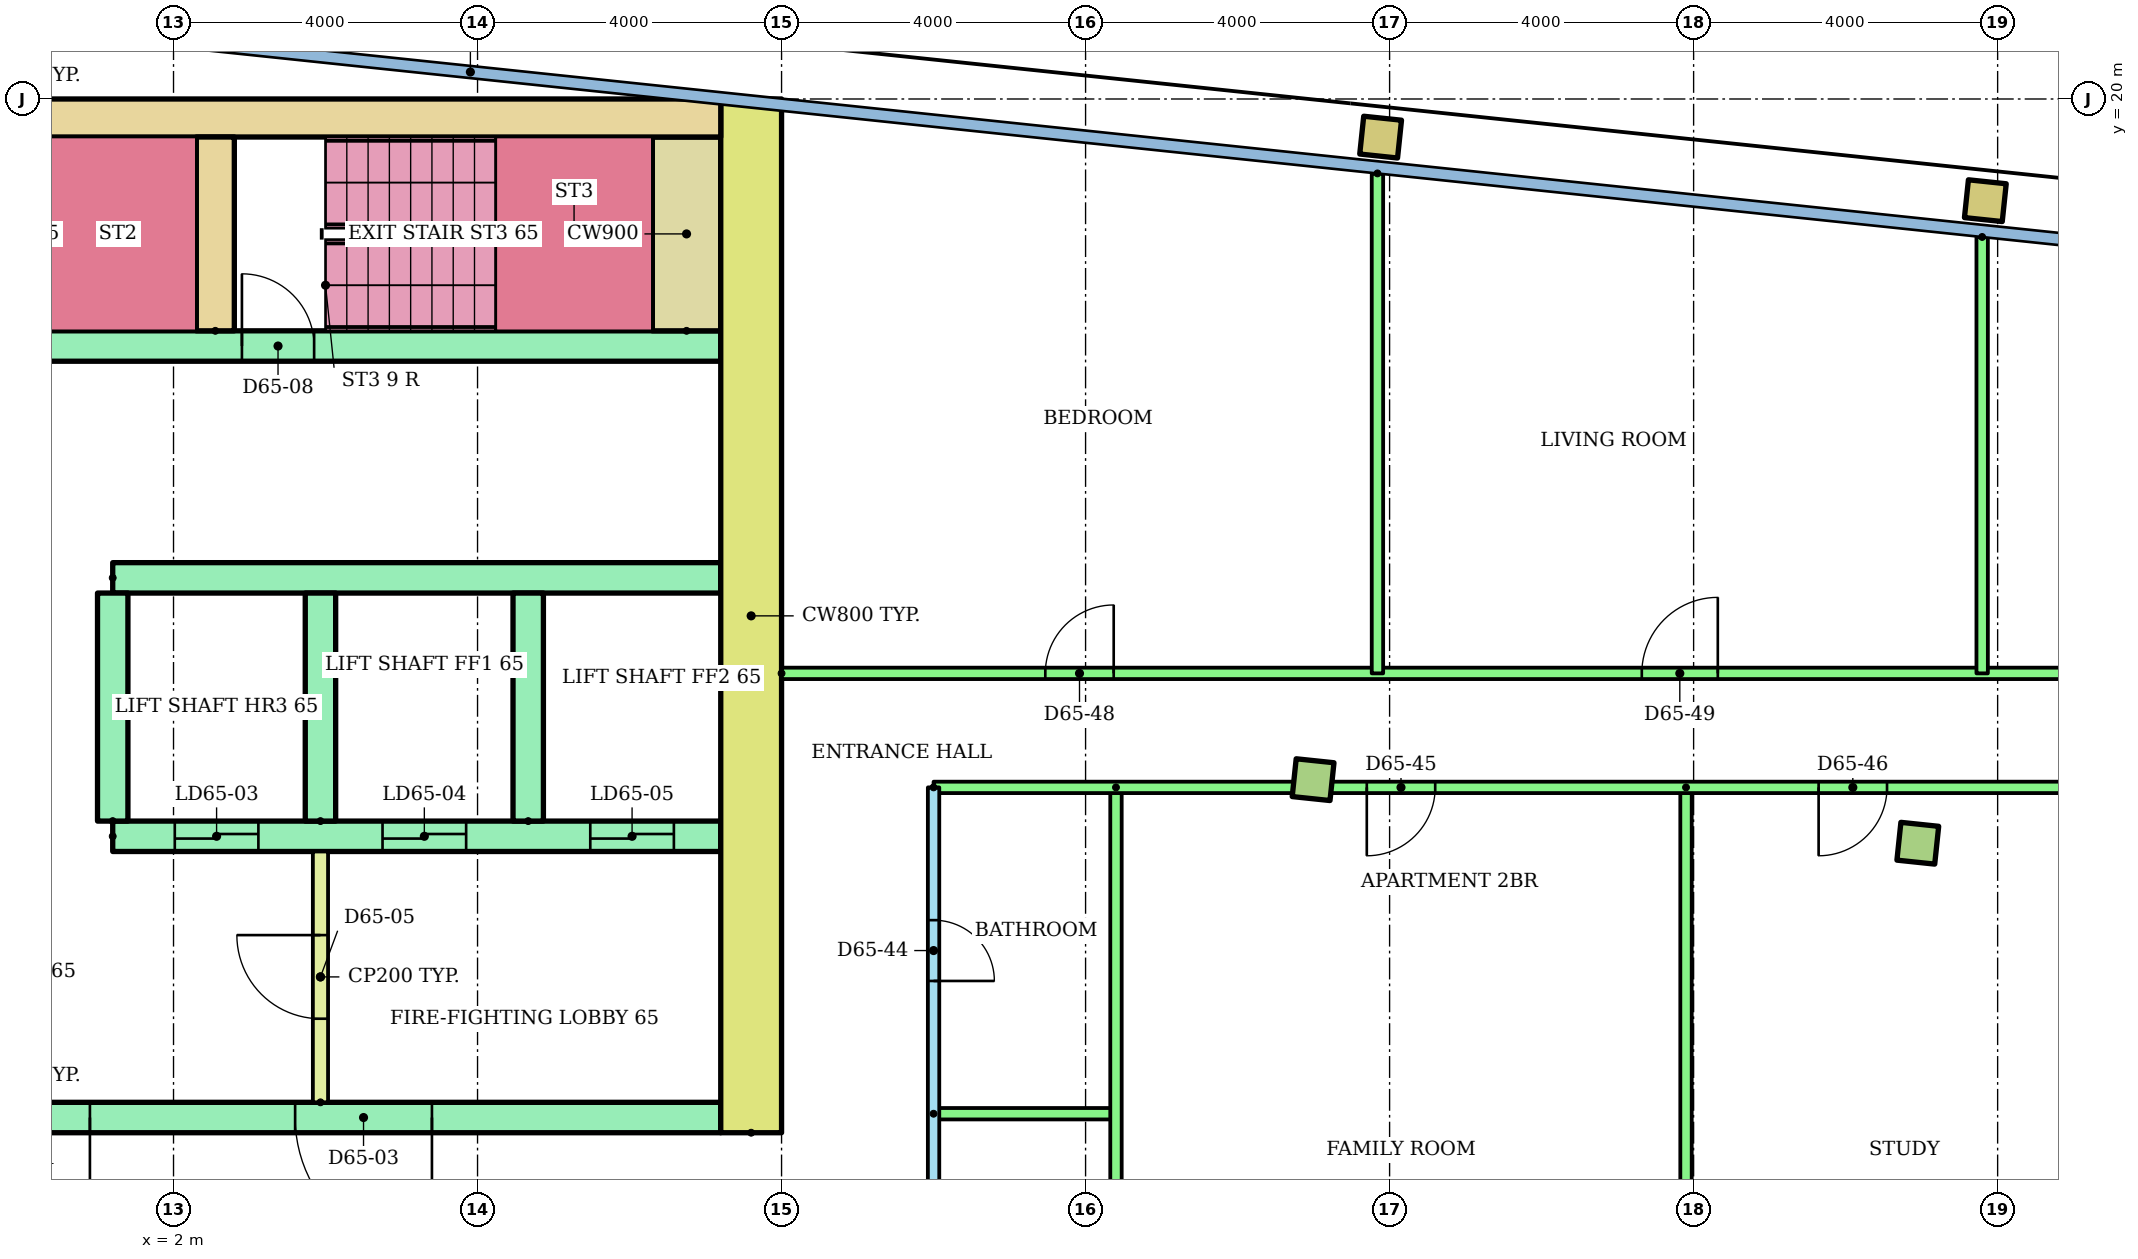
"""IFC4 building model, lengths in metres.
Left out: names, types, materials, properties, quantities, classifications, styles, units other than length and angle.
Written with IfcOpenShell. Run it as: python <this file> out.ifc"""

import sys

from ifc_helpers import new_model, si_unit, direction, frame, frame_2d, origin, origin_2d, place, context, subcontext, project, spatial, rectangle, hollow_rectangle, extrude, element, fill, save


model = new_model("IFC4")
c1 = context("Model", 3, precision=1e-05, world=origin(), true_north=direction((0.0, 1.0)))
c2 = subcontext(c1, "Body", "Model", "MODEL_VIEW")
j1 = project(units=[si_unit("LENGTHUNIT", "METRE"), si_unit("PLANEANGLEUNIT", "RADIAN")], contexts=[c1])
p1 = place(None, origin())
s1 = spatial("IfcSite", under=j1, at=p1, CompositionType="ELEMENT")
p2 = place(p1, origin())
s2 = spatial("IfcBuilding", under=s1, at=p2, CompositionType="ELEMENT")
p3 = place(p2, frame((0.0, 0.0, 253.1)))
s3 = spatial("IfcBuildingStorey", under=s2, at=p3, CompositionType="ELEMENT", Elevation=253.1)
for number, where, z_axis, x_axis in (
    (1, (16.993, 11.045, 0.0), (0.0, 0.0, 1.0), (0.995, -0.105, 0.0)),
    (2, (24.95, 10.209, 0.0), (0.0, 0.0, 1.0), (0.995, -0.105, 0.0)),
):
    element("IfcColumn", number, at=place(p3, frame(where, z_axis=z_axis, x_axis=x_axis)), inside=s3, PredefinedType="COLUMN", context=c2, shape_type="SweptSolid", body=[
        extrude(rectangle(XDim=0.5, YDim=0.5, at=origin_2d()), origin(), (0.0, 0.0, 1.0), 3.2),
    ])
for number, where, z_axis, x_axis in (
    (3, (17.882, 19.498, 0.0), (0.0, 0.0, 1.0), (0.995, -0.105, 0.0)),
    (4, (25.838, 18.662, 0.0), (0.0, 0.0, 1.0), (0.995, -0.105, 0.0)),
):
    element("IfcColumn", number, at=place(p3, frame(where, z_axis=z_axis, x_axis=x_axis)), inside=s3, PredefinedType="COLUMN", context=c2, shape_type="SweptSolid", body=[
        extrude(hollow_rectangle(XDim=0.5, YDim=0.5, WallThickness=0.025, at=origin_2d()), origin(), (0.0, 0.0, 1.0), 3.2),
    ])
p4 = place(p3, frame((9.6, 6.4, 0.0), z_axis=(0.0, 0.0, 1.0), x_axis=(0.0, 1.0, 0.0)))
e5 = element("IfcWall", 5, at=p4, inside=s3, PredefinedType="SHEAR", context=c2, shape_type="SweptSolid", body=[
    extrude(rectangle(XDim=13.6, YDim=0.8, at=frame_2d((6.8, 0.0))), origin(), (0.0, 0.0, 1.0), 2.92),
])
p5 = place(p3, frame((-9.2, 19.75, 0.0)))
e6 = element("IfcWall", 6, at=p5, inside=s3, PredefinedType="SHEAR", context=c2, shape_type="SweptSolid", body=[
    extrude(rectangle(XDim=18.4, YDim=0.5, at=frame_2d((9.2, 0.0))), origin(), (0.0, 0.0, 1.0), 2.92),
])
p6 = place(p3, frame((-9.2, 6.6, 0.0)))
e7 = element("IfcWall", 7, at=p6, inside=s3, PredefinedType="SHEAR", context=c2, shape_type="SweptSolid", body=[
    extrude(rectangle(XDim=18.4, YDim=0.4, at=frame_2d((9.2, 0.0))), origin(), (0.0, 0.0, 1.0), 2.92),
])
p7 = place(p6, frame((8.3, 0.0, 0.0)))
e8 = element("IfcOpeningElement", 8, at=p7, cuts=e7, PredefinedType="OPENING", context=c2, shape_type="SweptSolid", body=[
    extrude(rectangle(XDim=1.8, YDim=2.1, at=frame_2d((0.9, 1.05))), frame((0.0, 0.21, 0.0), z_axis=(0.0, -1.0, 0.0), x_axis=(1.0, 0.0, 0.0)), (0.0, 0.0, 1.0), 0.42),
])
p8 = place(p6, frame((3.8, 0.0, 0.0)))
e9 = element("IfcOpeningElement", 9, at=p8, cuts=e7, PredefinedType="OPENING", context=c2, shape_type="SweptSolid", body=[
    extrude(rectangle(XDim=1.8, YDim=2.1, at=frame_2d((0.9, 1.05))), frame((0.0, 0.21, 0.0), z_axis=(0.0, -1.0, 0.0), x_axis=(1.0, 0.0, 0.0)), (0.0, 0.0, 1.0), 0.42),
])
p9 = place(p6, frame((12.8, 0.0, 0.0)))
e10 = element("IfcOpeningElement", 10, at=p9, cuts=e7, PredefinedType="OPENING", context=c2, shape_type="SweptSolid", body=[
    extrude(rectangle(XDim=1.8, YDim=2.1, at=frame_2d((0.9, 1.05))), frame((0.0, 0.21, 0.0), z_axis=(0.0, -1.0, 0.0), x_axis=(1.0, 0.0, 0.0)), (0.0, 0.0, 1.0), 0.42),
])
p10 = place(p3, frame((1.2, 10.3, 0.0)))
e11 = element("IfcWall", 11, at=p10, inside=s3, PredefinedType="SHEAR", context=c2, shape_type="SweptSolid", body=[
    extrude(rectangle(XDim=8.0, YDim=0.4, at=frame_2d((4.0, 0.0))), origin(), (0.0, 0.0, 1.0), 2.92),
])
p11 = place(p10, frame((0.817, 0.0, 0.0)))
e12 = element("IfcOpeningElement", 12, at=p11, cuts=e11, PredefinedType="OPENING", context=c2, shape_type="SweptSolid", body=[
    extrude(rectangle(XDim=1.1, YDim=2.1, at=frame_2d((0.55, 1.05))), frame((0.0, 0.21, 0.0), z_axis=(0.0, -1.0, 0.0), x_axis=(1.0, 0.0, 0.0)), (0.0, 0.0, 1.0), 0.42),
])
p12 = place(p10, frame((3.55, 0.0, 0.0)))
e13 = element("IfcOpeningElement", 13, at=p12, cuts=e11, PredefinedType="OPENING", context=c2, shape_type="SweptSolid", body=[
    extrude(rectangle(XDim=1.1, YDim=2.1, at=frame_2d((0.55, 1.05))), frame((0.0, 0.21, 0.0), z_axis=(0.0, -1.0, 0.0), x_axis=(1.0, 0.0, 0.0)), (0.0, 0.0, 1.0), 0.42),
])
p13 = place(p10, frame((6.283, 0.0, 0.0)))
e14 = element("IfcOpeningElement", 14, at=p13, cuts=e11, PredefinedType="OPENING", context=c2, shape_type="SweptSolid", body=[
    extrude(rectangle(XDim=1.1, YDim=2.1, at=frame_2d((0.55, 1.05))), frame((0.0, 0.21, 0.0), z_axis=(0.0, -1.0, 0.0), x_axis=(1.0, 0.0, 0.0)), (0.0, 0.0, 1.0), 0.42),
])
p14 = place(p3, frame((1.2, 13.7, 0.0)))
e15 = element("IfcWall", 15, at=p14, inside=s3, PredefinedType="SHEAR", context=c2, shape_type="SweptSolid", body=[
    extrude(rectangle(XDim=8.0, YDim=0.4, at=frame_2d((4.0, 0.0))), origin(), (0.0, 0.0, 1.0), 2.92),
])
for number, where, z_axis, x_axis in (
    (16, (1.2, 10.5, 0.0), (0.0, 0.0, 1.0), (0.0, 1.0, 0.0)),
    (17, (3.933, 10.5, 0.0), (0.0, 0.0, 1.0), (0.0, 1.0, 0.0)),
    (18, (6.667, 10.5, 0.0), (0.0, 0.0, 1.0), (0.0, 1.0, 0.0)),
):
    element("IfcWall", number, at=place(p3, frame(where, z_axis=z_axis, x_axis=x_axis)), inside=s3, PredefinedType="SHEAR", context=c2, shape_type="SweptSolid", body=[
        extrude(rectangle(XDim=3.0, YDim=0.4, at=frame_2d((1.5, 0.0))), origin(), (0.0, 0.0, 1.0), 2.92),
    ])
p15 = place(p3, frame((3.933, 6.8, 0.0), z_axis=(0.0, 0.0, 1.0), x_axis=(0.0, 1.0, 0.0)))
e19 = element("IfcWall", 19, at=p15, inside=s3, PredefinedType="PARTITIONING", context=c2, shape_type="SweptSolid", body=[
    extrude(rectangle(XDim=3.3, YDim=0.2, at=frame_2d((1.65, 0.0))), origin(), (0.0, 0.0, 1.0), 2.92),
])
p16 = place(p15, frame((1.1, 0.0, 0.0)))
e20 = element("IfcOpeningElement", 20, at=p16, cuts=e19, PredefinedType="OPENING", context=c2, shape_type="SweptSolid", body=[
    extrude(rectangle(XDim=1.1, YDim=2.1, at=frame_2d((0.55, 1.05))), frame((0.0, 0.11, 0.0), z_axis=(0.0, -1.0, 0.0), x_axis=(1.0, 0.0, 0.0)), (0.0, 0.0, 1.0), 0.22),
])
p17 = place(p3, frame((-9.2, 16.75, 0.0)))
e21 = element("IfcWall", 21, at=p17, inside=s3, PredefinedType="SHEAR", context=c2, shape_type="SweptSolid", body=[
    extrude(rectangle(XDim=18.4, YDim=0.4, at=frame_2d((9.2, 0.0))), origin(), (0.0, 0.0, 1.0), 2.92),
])
p18 = place(p17, frame((0.1, 0.0, 0.0)))
e22 = element("IfcOpeningElement", 22, at=p18, cuts=e21, PredefinedType="OPENING", context=c2, shape_type="SweptSolid", body=[
    extrude(rectangle(XDim=0.95, YDim=2.1, at=frame_2d((0.475, 1.05))), frame((0.0, 0.21, 0.0), z_axis=(0.0, -1.0, 0.0), x_axis=(1.0, 0.0, 0.0)), (0.0, 0.0, 1.0), 0.42),
])
p19 = place(p17, frame((6.1, 0.0, 0.0)))
e23 = element("IfcOpeningElement", 23, at=p19, cuts=e21, PredefinedType="OPENING", context=c2, shape_type="SweptSolid", body=[
    extrude(rectangle(XDim=0.95, YDim=2.1, at=frame_2d((0.475, 1.05))), frame((0.0, 0.21, 0.0), z_axis=(0.0, -1.0, 0.0), x_axis=(1.0, 0.0, 0.0)), (0.0, 0.0, 1.0), 0.42),
])
p20 = place(p17, frame((12.1, 0.0, 0.0)))
e24 = element("IfcOpeningElement", 24, at=p20, cuts=e21, PredefinedType="OPENING", context=c2, shape_type="SweptSolid", body=[
    extrude(rectangle(XDim=0.95, YDim=2.1, at=frame_2d((0.475, 1.05))), frame((0.0, 0.21, 0.0), z_axis=(0.0, -1.0, 0.0), x_axis=(1.0, 0.0, 0.0)), (0.0, 0.0, 1.0), 0.42),
])
p21 = place(p3, frame((2.55, 16.95, 0.0), z_axis=(0.0, 0.0, 1.0), x_axis=(0.0, 1.0, 0.0)))
e25 = element("IfcWall", 25, at=p21, inside=s3, PredefinedType="SHEAR", context=c2, shape_type="SweptSolid", body=[
    extrude(rectangle(XDim=2.55, YDim=0.5, at=frame_2d((1.275, 0.0))), origin(), (0.0, 0.0, 1.0), 2.92),
])
p22 = place(p3, frame((8.75, 16.95, 0.0), z_axis=(0.0, 0.0, 1.0), x_axis=(0.0, 1.0, 0.0)))
e26 = element("IfcWall", 26, at=p22, inside=s3, PredefinedType="SHEAR", context=c2, shape_type="SweptSolid", body=[
    extrude(rectangle(XDim=2.55, YDim=0.9, at=frame_2d((1.275, 0.0))), origin(), (0.0, 0.0, 1.0), 2.92),
])
p23 = place(p3, frame((12.0, 10.943, 0.0), z_axis=(0.0, 0.0, 1.0), x_axis=(0.0, -1.0, 0.0)))
e27 = element("IfcWall", 27, at=p23, inside=s3, PredefinedType="PARTITIONING", context=c2, shape_type="SweptSolid", body=[
    extrude(rectangle(XDim=9.543, YDim=0.15, at=frame_2d((4.772, 0.0))), origin(), (0.0, 0.0, 1.0), 2.4),
])
p24 = place(p23, frame((6.469, 0.0, 0.0)))
e28 = element("IfcOpeningElement", 28, at=p24, cuts=e27, PredefinedType="OPENING", context=c2, shape_type="SweptSolid", body=[
    extrude(rectangle(XDim=0.9, YDim=2.1, at=frame_2d((0.45, 1.05))), frame((0.0, 0.085, 0.0), z_axis=(0.0, -1.0, 0.0), x_axis=(1.0, 0.0, 0.0)), (0.0, 0.0, 1.0), 0.17),
])
p25 = place(p23, frame((1.747, 0.0, 0.0)))
e29 = element("IfcOpeningElement", 29, at=p25, cuts=e27, PredefinedType="OPENING", context=c2, shape_type="SweptSolid", body=[
    extrude(rectangle(XDim=0.8, YDim=2.1, at=frame_2d((0.4, 1.05))), frame((0.0, 0.085, 0.0), z_axis=(0.0, -1.0, 0.0), x_axis=(1.0, 0.0, 0.0)), (0.0, 0.0, 1.0), 0.17),
])
p26 = place(p3, frame((12.0, 6.65, 0.0)))
e30 = element("IfcWall", 30, at=p26, inside=s3, PredefinedType="PARTITIONING", context=c2, shape_type="SweptSolid", body=[
    extrude(rectangle(XDim=2.4, YDim=0.15, at=frame_2d((1.2, 0.0))), origin(), (0.0, 0.0, 1.0), 2.4),
])
for number, where, z_axis, x_axis in (
    (31, (14.4, 10.943, 0.0), (0.0, 0.0, 1.0), (0.0, -1.0, 0.0)),
    (32, (21.9, 10.943, 0.0), (0.0, 0.0, 1.0), (0.0, -1.0, 0.0)),
):
    element("IfcWall", number, at=place(p3, frame(where, z_axis=z_axis, x_axis=x_axis)), inside=s3, PredefinedType="PARTITIONING", context=c2, shape_type="SweptSolid", body=[
        extrude(rectangle(XDim=9.543, YDim=0.15, at=frame_2d((4.772, 0.0))), origin(), (0.0, 0.0, 1.0), 2.4),
    ])
p27 = place(p3, frame((32.087, 10.943, 0.0), z_axis=(0.0, 0.0, 1.0), x_axis=(-1.0, 0.0, 0.0)))
e33 = element("IfcWall", 33, at=p27, inside=s3, PredefinedType="PARTITIONING", context=c2, shape_type="SweptSolid", body=[
    extrude(rectangle(XDim=20.087, YDim=0.15, at=frame_2d((10.043, 0.0))), origin(), (0.0, 0.0, 1.0), 2.4),
])
p28 = place(p27, frame((13.487, 0.0, 0.0)))
e34 = element("IfcOpeningElement", 34, at=p28, cuts=e33, PredefinedType="OPENING", context=c2, shape_type="SweptSolid", body=[
    extrude(rectangle(XDim=0.9, YDim=2.1, at=frame_2d((0.45, 1.05))), frame((0.0, 0.085, 0.0), z_axis=(0.0, -1.0, 0.0), x_axis=(1.0, 0.0, 0.0)), (0.0, 0.0, 1.0), 0.17),
])
p29 = place(p27, frame((7.542, 0.0, 0.0)))
e35 = element("IfcOpeningElement", 35, at=p29, cuts=e33, PredefinedType="OPENING", context=c2, shape_type="SweptSolid", body=[
    extrude(rectangle(XDim=0.9, YDim=2.1, at=frame_2d((0.45, 1.05))), frame((0.0, 0.085, 0.0), z_axis=(0.0, -1.0, 0.0), x_axis=(1.0, 0.0, 0.0)), (0.0, 0.0, 1.0), 0.17),
])
p30 = place(p27, frame((1.783, 0.0, 0.0)))
e36 = element("IfcOpeningElement", 36, at=p30, cuts=e33, PredefinedType="OPENING", context=c2, shape_type="SweptSolid", body=[
    extrude(rectangle(XDim=0.9, YDim=2.1, at=frame_2d((0.45, 1.05))), frame((0.0, 0.085, 0.0), z_axis=(0.0, -1.0, 0.0), x_axis=(1.0, 0.0, 0.0)), (0.0, 0.0, 1.0), 0.17),
])
p31 = place(p3, frame((10.0, 12.443, 0.0)))
e37 = element("IfcWall", 37, at=p31, inside=s3, PredefinedType="PARTITIONING", context=c2, shape_type="SweptSolid", body=[
    extrude(rectangle(XDim=22.244, YDim=0.15, at=frame_2d((11.122, 0.0))), origin(), (0.0, 0.0, 1.0), 2.4),
])
p32 = place(p31, frame((3.47, 0.0, 0.0)))
e38 = element("IfcOpeningElement", 38, at=p32, cuts=e37, PredefinedType="OPENING", context=c2, shape_type="SweptSolid", body=[
    extrude(rectangle(XDim=0.9, YDim=2.1, at=frame_2d((0.45, 1.05))), frame((0.0, 0.085, 0.0), z_axis=(0.0, -1.0, 0.0), x_axis=(1.0, 0.0, 0.0)), (0.0, 0.0, 1.0), 0.17),
])
p33 = place(p31, frame((11.318, 0.0, 0.0)))
e39 = element("IfcOpeningElement", 39, at=p33, cuts=e37, PredefinedType="OPENING", context=c2, shape_type="SweptSolid", body=[
    extrude(rectangle(XDim=1.0, YDim=2.1, at=frame_2d((0.5, 1.05))), frame((0.0, 0.085, 0.0), z_axis=(0.0, -1.0, 0.0), x_axis=(1.0, 0.0, 0.0)), (0.0, 0.0, 1.0), 0.17),
])
p34 = place(p31, frame((18.477, 0.0, 0.0)))
e40 = element("IfcOpeningElement", 40, at=p34, cuts=e37, PredefinedType="OPENING", context=c2, shape_type="SweptSolid", body=[
    extrude(rectangle(XDim=0.9, YDim=2.1, at=frame_2d((0.45, 1.05))), frame((0.0, 0.085, 0.0), z_axis=(0.0, -1.0, 0.0), x_axis=(1.0, 0.0, 0.0)), (0.0, 0.0, 1.0), 0.17),
])
p35 = place(p3, frame((17.84, 19.021, 0.0), z_axis=(0.0, 0.0, 1.0), x_axis=(0.0, -1.0, 0.0)))
e41 = element("IfcWall", 41, at=p35, inside=s3, PredefinedType="PARTITIONING", context=c2, shape_type="SweptSolid", body=[
    extrude(rectangle(XDim=6.578, YDim=0.15, at=frame_2d((3.289, 0.0))), origin(), (0.0, 0.0, 1.0), 2.4),
])
p36 = place(p3, frame((25.796, 18.185, 0.0), z_axis=(0.0, 0.0, 1.0), x_axis=(0.0, -1.0, 0.0)))
e42 = element("IfcWall", 42, at=p36, inside=s3, PredefinedType="PARTITIONING", context=c2, shape_type="SweptSolid", body=[
    extrude(rectangle(XDim=5.741, YDim=0.15, at=frame_2d((2.871, 0.0))), origin(), (0.0, 0.0, 1.0), 2.4),
])
p37 = place(p7, frame((1.8, 0.0, 0.0), z_axis=(0.0, 0.0, 1.0), x_axis=(-1.0, 0.0, 0.0)))
e43 = element("IfcDoor", 43, at=p37, inside=s3, OperationType="DOUBLE_DOOR_SINGLE_SWING", PredefinedType="DOOR", context=c2, shape_type="SweptSolid", body=[
    extrude(rectangle(XDim=1.8, YDim=2.1, at=frame_2d((0.9, 1.05))), frame((0.0, 0.025, 0.0), z_axis=(0.0, -1.0, 0.0), x_axis=(1.0, 0.0, 0.0)), (0.0, 0.0, 1.0), 0.05),
])
fill(e8, e43)
p38 = place(p9, frame((1.8, 0.0, 0.0), z_axis=(0.0, 0.0, 1.0), x_axis=(-1.0, 0.0, 0.0)))
e44 = element("IfcDoor", 44, at=p38, inside=s3, OperationType="DOUBLE_DOOR_SINGLE_SWING", PredefinedType="DOOR", context=c2, shape_type="SweptSolid", body=[
    extrude(rectangle(XDim=1.8, YDim=2.1, at=frame_2d((0.9, 1.05))), frame((0.0, 0.025, 0.0), z_axis=(0.0, -1.0, 0.0), x_axis=(1.0, 0.0, 0.0)), (0.0, 0.0, 1.0), 0.05),
])
fill(e10, e44)
p39 = place(p11, origin())
e45 = element("IfcDoor", 45, at=p39, inside=s3, OperationType="SLIDING_TO_LEFT", PredefinedType="DOOR", context=c2, shape_type="SweptSolid", body=[
    extrude(rectangle(XDim=1.1, YDim=2.1, at=frame_2d((0.55, 1.05))), frame((0.0, 0.025, 0.0), z_axis=(0.0, -1.0, 0.0), x_axis=(1.0, 0.0, 0.0)), (0.0, 0.0, 1.0), 0.05),
])
fill(e12, e45)
p40 = place(p12, origin())
e46 = element("IfcDoor", 46, at=p40, inside=s3, OperationType="SLIDING_TO_LEFT", PredefinedType="DOOR", context=c2, shape_type="SweptSolid", body=[
    extrude(rectangle(XDim=1.1, YDim=2.1, at=frame_2d((0.55, 1.05))), frame((0.0, 0.025, 0.0), z_axis=(0.0, -1.0, 0.0), x_axis=(1.0, 0.0, 0.0)), (0.0, 0.0, 1.0), 0.05),
])
fill(e13, e46)
p41 = place(p13, origin())
e47 = element("IfcDoor", 47, at=p41, inside=s3, OperationType="SLIDING_TO_LEFT", PredefinedType="DOOR", context=c2, shape_type="SweptSolid", body=[
    extrude(rectangle(XDim=1.1, YDim=2.1, at=frame_2d((0.55, 1.05))), frame((0.0, 0.025, 0.0), z_axis=(0.0, -1.0, 0.0), x_axis=(1.0, 0.0, 0.0)), (0.0, 0.0, 1.0), 0.05),
])
fill(e14, e47)
p42 = place(p16, origin())
e48 = element("IfcDoor", 48, at=p42, inside=s3, OperationType="SINGLE_SWING_RIGHT", PredefinedType="DOOR", context=c2, shape_type="SweptSolid", body=[
    extrude(rectangle(XDim=1.1, YDim=2.1, at=frame_2d((0.55, 1.05))), frame((0.0, 0.025, 0.0), z_axis=(0.0, -1.0, 0.0), x_axis=(1.0, 0.0, 0.0)), (0.0, 0.0, 1.0), 0.05),
])
fill(e20, e48)
p43 = place(p20, origin())
e49 = element("IfcDoor", 49, at=p43, inside=s3, OperationType="SINGLE_SWING_LEFT", PredefinedType="DOOR", context=c2, shape_type="SweptSolid", body=[
    extrude(rectangle(XDim=0.95, YDim=2.1, at=frame_2d((0.475, 1.05))), frame((0.0, 0.025, 0.0), z_axis=(0.0, -1.0, 0.0), x_axis=(1.0, 0.0, 0.0)), (0.0, 0.0, 1.0), 0.05),
])
fill(e24, e49)
p44 = place(p25, origin())
e50 = element("IfcDoor", 50, at=p44, inside=s3, OperationType="SINGLE_SWING_RIGHT", PredefinedType="DOOR", context=c2, shape_type="SweptSolid", body=[
    extrude(rectangle(XDim=0.8, YDim=2.1, at=frame_2d((0.4, 1.05))), frame((0.0, 0.025, 0.0), z_axis=(0.0, -1.0, 0.0), x_axis=(1.0, 0.0, 0.0)), (0.0, 0.0, 1.0), 0.05),
])
fill(e29, e50)
p45 = place(p28, origin())
e51 = element("IfcDoor", 51, at=p45, inside=s3, OperationType="SINGLE_SWING_RIGHT", PredefinedType="DOOR", context=c2, shape_type="SweptSolid", body=[
    extrude(rectangle(XDim=0.9, YDim=2.1, at=frame_2d((0.45, 1.05))), frame((0.0, 0.025, 0.0), z_axis=(0.0, -1.0, 0.0), x_axis=(1.0, 0.0, 0.0)), (0.0, 0.0, 1.0), 0.05),
])
fill(e34, e51)
p46 = place(p29, origin())
e52 = element("IfcDoor", 52, at=p46, inside=s3, OperationType="SINGLE_SWING_RIGHT", PredefinedType="DOOR", context=c2, shape_type="SweptSolid", body=[
    extrude(rectangle(XDim=0.9, YDim=2.1, at=frame_2d((0.45, 1.05))), frame((0.0, 0.025, 0.0), z_axis=(0.0, -1.0, 0.0), x_axis=(1.0, 0.0, 0.0)), (0.0, 0.0, 1.0), 0.05),
])
fill(e35, e52)
p47 = place(p32, origin())
e53 = element("IfcDoor", 53, at=p47, inside=s3, OperationType="SINGLE_SWING_RIGHT", PredefinedType="DOOR", context=c2, shape_type="SweptSolid", body=[
    extrude(rectangle(XDim=0.9, YDim=2.1, at=frame_2d((0.45, 1.05))), frame((0.0, 0.025, 0.0), z_axis=(0.0, -1.0, 0.0), x_axis=(1.0, 0.0, 0.0)), (0.0, 0.0, 1.0), 0.05),
])
fill(e38, e53)
p48 = place(p33, origin())
e54 = element("IfcDoor", 54, at=p48, inside=s3, OperationType="SINGLE_SWING_RIGHT", PredefinedType="DOOR", context=c2, shape_type="SweptSolid", body=[
    extrude(rectangle(XDim=1.0, YDim=2.1, at=frame_2d((0.5, 1.05))), frame((0.0, 0.025, 0.0), z_axis=(0.0, -1.0, 0.0), x_axis=(1.0, 0.0, 0.0)), (0.0, 0.0, 1.0), 0.05),
])
fill(e39, e54)
save(model, sys.argv[1])
